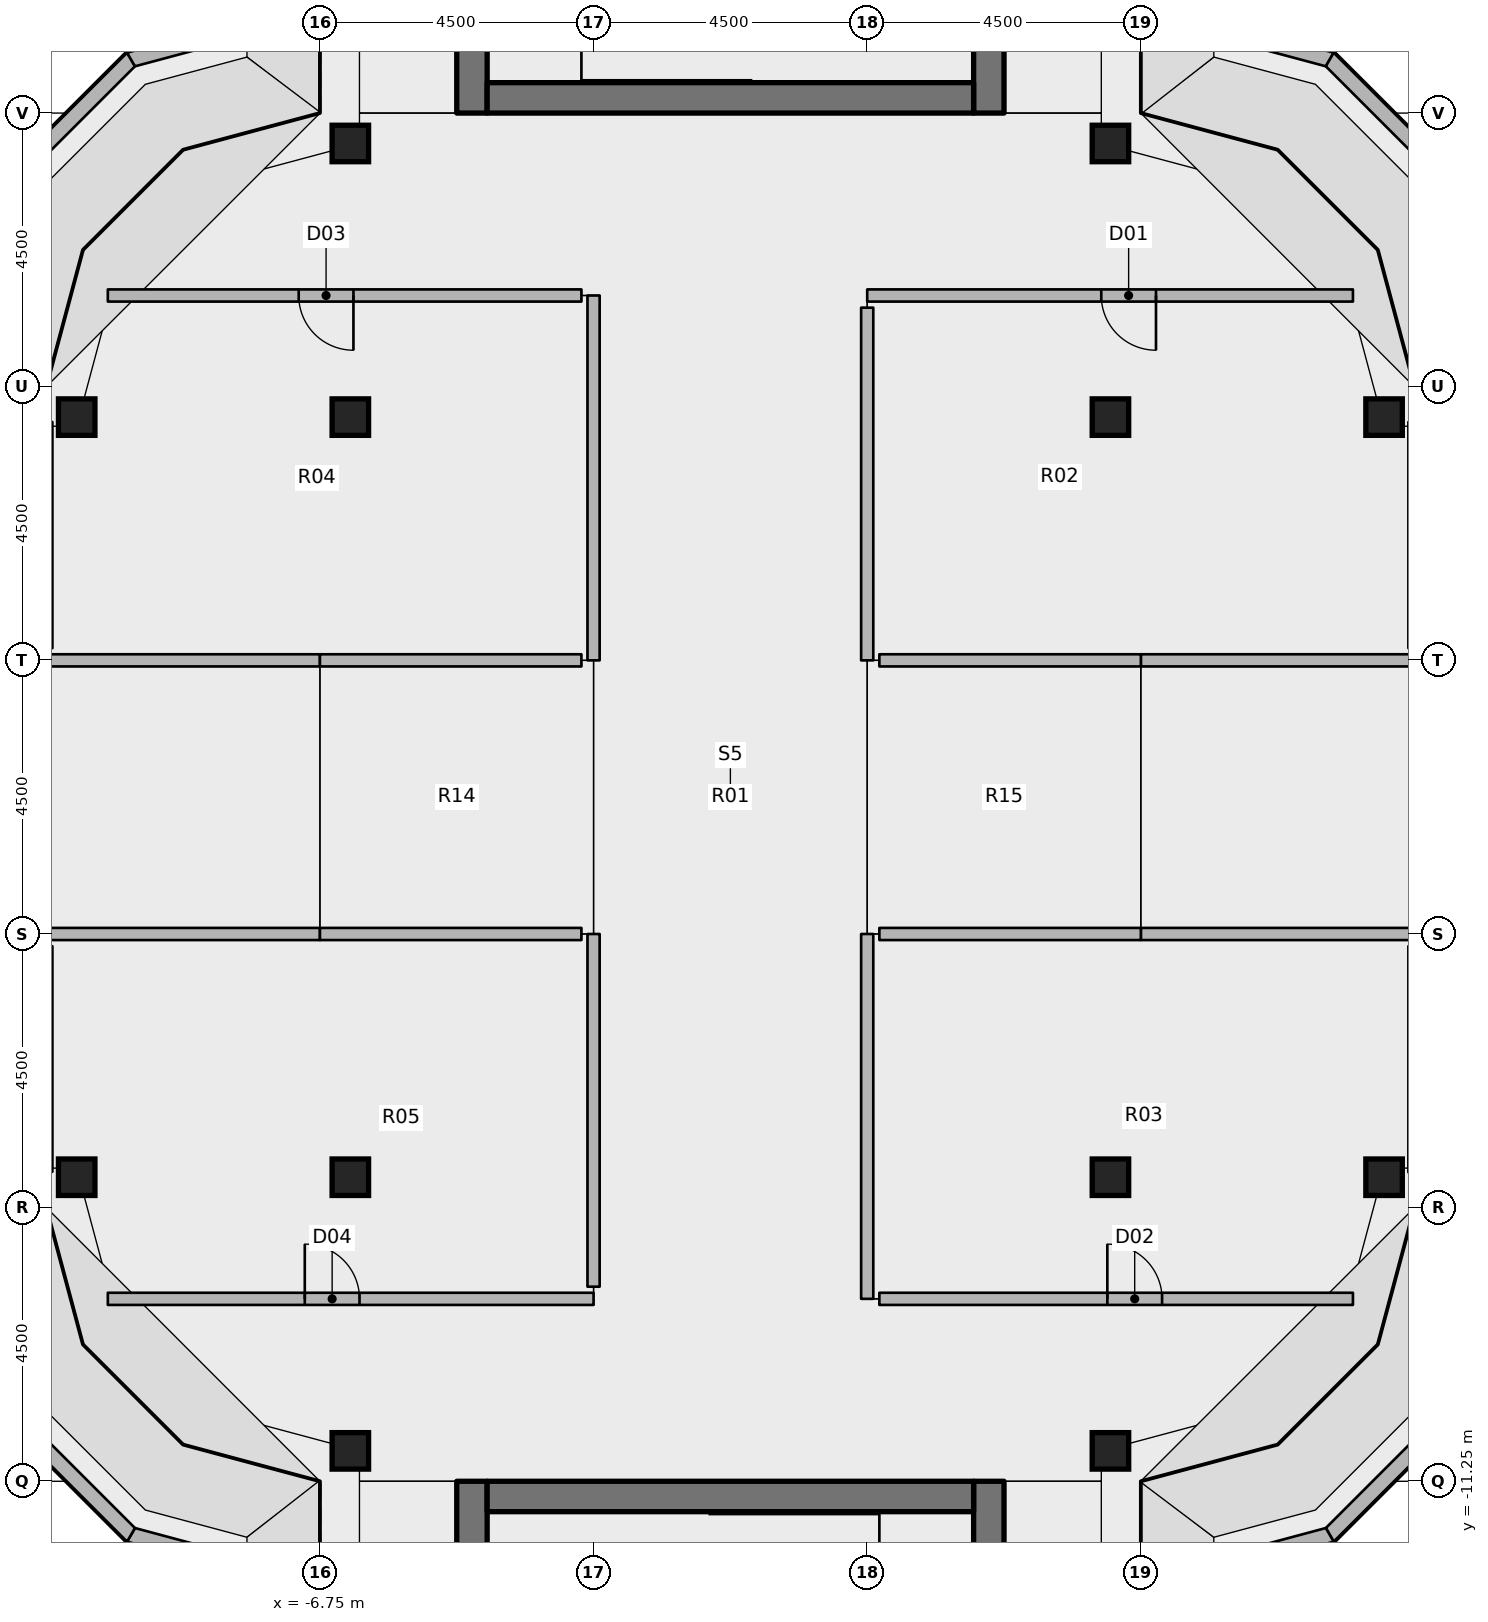
"""IFC4 building model, lengths in metres.
Left out: names, types, materials, properties, quantities, classifications, styles, units other than length and angle.
Written with IfcOpenShell. Run it as: python <this file> out.ifc"""

import sys

from ifc_helpers import new_model, si_unit, direction, frame, frame_2d, origin, origin_2d, place, context, subcontext, project, spatial, polyline, rectangle, outline, extrude, element, fill, save


model = new_model("IFC4")
c1 = context("Model", 3, precision=1e-05, world=origin(), true_north=direction((0.0, 1.0)))
c2 = subcontext(c1, "Body", "Model", "MODEL_VIEW")
j1 = project(units=[si_unit("LENGTHUNIT", "METRE"), si_unit("PLANEANGLEUNIT", "RADIAN")], contexts=[c1])
p1 = place(None, origin())
s1 = spatial("IfcSite", under=j1, at=p1, CompositionType="ELEMENT")
p2 = place(p1, origin())
s2 = spatial("IfcBuilding", under=s1, at=p2, CompositionType="ELEMENT")
p3 = place(p2, frame((0.0, 0.0, 295.2)))
s3 = spatial("IfcBuildingStorey", under=s2, at=p3, CompositionType="ELEMENT", Elevation=295.2)
for number, where, z_axis, x_axis in (
    (1, (-10.75, -6.25, 0.0), (0.0, 0.0, 1.0), (1.0, 0.0, 0.0)),
    (2, (-10.75, 6.25, 0.0), (0.0, 0.0, 1.0), (1.0, 0.0, 0.0)),
    (3, (-6.25, -10.75, 0.0), (0.0, 0.0, 1.0), (1.0, 0.0, 0.0)),
    (4, (-6.25, -6.25, 0.0), (0.0, 0.0, 1.0), (1.0, 0.0, 0.0)),
    (5, (-6.25, 6.25, 0.0), (0.0, 0.0, 1.0), (1.0, 0.0, 0.0)),
    (6, (-6.25, 10.75, 0.0), (0.0, 0.0, 1.0), (1.0, 0.0, 0.0)),
    (7, (6.25, -10.75, 0.0), (0.0, 0.0, 1.0), (1.0, 0.0, 0.0)),
    (8, (6.25, -6.25, 0.0), (0.0, 0.0, 1.0), (1.0, 0.0, 0.0)),
    (9, (6.25, 6.25, 0.0), (0.0, 0.0, 1.0), (1.0, 0.0, 0.0)),
    (10, (6.25, 10.75, 0.0), (0.0, 0.0, 1.0), (1.0, 0.0, 0.0)),
    (11, (10.75, -6.25, 0.0), (0.0, 0.0, 1.0), (1.0, 0.0, 0.0)),
    (12, (10.75, 6.25, 0.0), (0.0, 0.0, 1.0), (1.0, 0.0, 0.0)),
):
    element("IfcColumn", number, at=place(p3, frame(where, z_axis=z_axis, x_axis=x_axis)), inside=s3, PredefinedType="COLUMN", context=c2, shape_type="SweptSolid", body=[
        extrude(rectangle(XDim=0.6, YDim=0.6, at=origin_2d()), origin(), (0.0, 0.0, 1.0), 3.45),
    ])
p4 = place(p3, frame((-4.25, 11.25, 0.0), z_axis=(0.0, 0.0, 1.0), x_axis=(0.0, 1.0, 0.0)))
e13 = element("IfcWall", 13, at=p4, inside=s3, PredefinedType="SHEAR", context=c2, shape_type="SweptSolid", body=[
    extrude(rectangle(XDim=15.0, YDim=0.5, at=frame_2d((7.5, 0.0))), origin(), (0.0, 0.0, 1.0), 3.6),
])
p5 = place(p4, frame((7.15, 0.0, 0.0)))
e14 = element("IfcOpeningElement", 14, at=p5, cuts=e13, PredefinedType="OPENING", context=c2, shape_type="SweptSolid", body=[
    extrude(rectangle(XDim=1.5, YDim=2.3, at=frame_2d((0.75, 1.15))), frame((0.0, 0.26, 0.0), z_axis=(0.0, -1.0, 0.0), x_axis=(1.0, 0.0, 0.0)), (0.0, 0.0, 1.0), 0.52),
])
p6 = place(p4, frame((13.9, 0.0, 0.0)))
e15 = element("IfcOpeningElement", 15, at=p6, cuts=e13, PredefinedType="OPENING", context=c2, shape_type="SweptSolid", body=[
    extrude(rectangle(XDim=0.9, YDim=2.1, at=frame_2d((0.45, 1.05))), frame((0.0, 0.26, 0.0), z_axis=(0.0, -1.0, 0.0), x_axis=(1.0, 0.0, 0.0)), (0.0, 0.0, 1.0), 0.52),
])
p7 = place(p4, frame((1.15, 0.0, 0.0)))
e16 = element("IfcOpeningElement", 16, at=p7, cuts=e13, PredefinedType="OPENING", context=c2, shape_type="SweptSolid", body=[
    extrude(rectangle(XDim=1.2, YDim=2.1, at=frame_2d((0.6, 1.05))), frame((0.0, 0.26, 0.0), z_axis=(0.0, -1.0, 0.0), x_axis=(1.0, 0.0, 0.0)), (0.0, 0.0, 1.0), 0.52),
])
p8 = place(p3, frame((4.25, 11.25, 0.0), z_axis=(0.0, 0.0, 1.0), x_axis=(0.0, 1.0, 0.0)))
e17 = element("IfcWall", 17, at=p8, inside=s3, PredefinedType="SHEAR", context=c2, shape_type="SweptSolid", body=[
    extrude(rectangle(XDim=15.0, YDim=0.5, at=frame_2d((7.5, 0.0))), origin(), (0.0, 0.0, 1.0), 3.6),
])
p9 = place(p8, frame((7.15, 0.0, 0.0)))
e18 = element("IfcOpeningElement", 18, at=p9, cuts=e17, PredefinedType="OPENING", context=c2, shape_type="SweptSolid", body=[
    extrude(rectangle(XDim=1.5, YDim=2.3, at=frame_2d((0.75, 1.15))), frame((0.0, 0.26, 0.0), z_axis=(0.0, -1.0, 0.0), x_axis=(1.0, 0.0, 0.0)), (0.0, 0.0, 1.0), 0.52),
])
p10 = place(p8, frame((5.55, 0.0, 0.0)))
e19 = element("IfcOpeningElement", 19, at=p10, cuts=e17, PredefinedType="OPENING", context=c2, shape_type="SweptSolid", body=[
    extrude(rectangle(XDim=1.2, YDim=2.1, at=frame_2d((0.6, 1.05))), frame((0.0, 0.26, 0.0), z_axis=(0.0, -1.0, 0.0), x_axis=(1.0, 0.0, 0.0)), (0.0, 0.0, 1.0), 0.52),
])
p11 = place(p3, frame((-4.0, 11.5, 0.0), z_axis=(0.0, 0.0, 1.0), x_axis=(1.0, 0.0, 0.0)))
e20 = element("IfcWall", 20, at=p11, inside=s3, PredefinedType="SHEAR", context=c2, shape_type="SweptSolid", body=[
    extrude(rectangle(XDim=8.0, YDim=0.5, at=frame_2d((4.0, 0.0))), origin(), (0.0, 0.0, 1.0), 3.6),
])
p12 = place(p3, frame((-4.25, -11.25, 0.0), z_axis=(0.0, 0.0, 1.0), x_axis=(0.0, -1.0, 0.0)))
e21 = element("IfcWall", 21, at=p12, inside=s3, PredefinedType="SHEAR", context=c2, shape_type="SweptSolid", body=[
    extrude(rectangle(XDim=15.0, YDim=0.5, at=frame_2d((7.5, 0.0))), origin(), (0.0, 0.0, 1.0), 3.6),
])
p13 = place(p12, frame((7.15, 0.0, 0.0)))
e22 = element("IfcOpeningElement", 22, at=p13, cuts=e21, PredefinedType="OPENING", context=c2, shape_type="SweptSolid", body=[
    extrude(rectangle(XDim=1.5, YDim=2.3, at=frame_2d((0.75, 1.15))), frame((0.0, 0.26, 0.0), z_axis=(0.0, -1.0, 0.0), x_axis=(1.0, 0.0, 0.0)), (0.0, 0.0, 1.0), 0.52),
])
p14 = place(p12, frame((5.55, 0.0, 0.0)))
e23 = element("IfcOpeningElement", 23, at=p14, cuts=e21, PredefinedType="OPENING", context=c2, shape_type="SweptSolid", body=[
    extrude(rectangle(XDim=1.2, YDim=2.1, at=frame_2d((0.6, 1.05))), frame((0.0, 0.26, 0.0), z_axis=(0.0, -1.0, 0.0), x_axis=(1.0, 0.0, 0.0)), (0.0, 0.0, 1.0), 0.52),
])
p15 = place(p3, frame((4.25, -11.25, 0.0), z_axis=(0.0, 0.0, 1.0), x_axis=(0.0, -1.0, 0.0)))
e24 = element("IfcWall", 24, at=p15, inside=s3, PredefinedType="SHEAR", context=c2, shape_type="SweptSolid", body=[
    extrude(rectangle(XDim=15.0, YDim=0.5, at=frame_2d((7.5, 0.0))), origin(), (0.0, 0.0, 1.0), 3.6),
])
p16 = place(p15, frame((7.15, 0.0, 0.0)))
e25 = element("IfcOpeningElement", 25, at=p16, cuts=e24, PredefinedType="OPENING", context=c2, shape_type="SweptSolid", body=[
    extrude(rectangle(XDim=1.5, YDim=2.3, at=frame_2d((0.75, 1.15))), frame((0.0, 0.26, 0.0), z_axis=(0.0, -1.0, 0.0), x_axis=(1.0, 0.0, 0.0)), (0.0, 0.0, 1.0), 0.52),
])
p17 = place(p15, frame((13.9, 0.0, 0.0)))
e26 = element("IfcOpeningElement", 26, at=p17, cuts=e24, PredefinedType="OPENING", context=c2, shape_type="SweptSolid", body=[
    extrude(rectangle(XDim=0.9, YDim=2.1, at=frame_2d((0.45, 1.05))), frame((0.0, 0.26, 0.0), z_axis=(0.0, -1.0, 0.0), x_axis=(1.0, 0.0, 0.0)), (0.0, 0.0, 1.0), 0.52),
])
p18 = place(p15, frame((1.15, 0.0, 0.0)))
e27 = element("IfcOpeningElement", 27, at=p18, cuts=e24, PredefinedType="OPENING", context=c2, shape_type="SweptSolid", body=[
    extrude(rectangle(XDim=1.2, YDim=2.1, at=frame_2d((0.6, 1.05))), frame((0.0, 0.26, 0.0), z_axis=(0.0, -1.0, 0.0), x_axis=(1.0, 0.0, 0.0)), (0.0, 0.0, 1.0), 0.52),
])
p19 = place(p3, frame((-4.0, -11.5, 0.0), z_axis=(0.0, 0.0, 1.0), x_axis=(1.0, 0.0, 0.0)))
e28 = element("IfcWall", 28, at=p19, inside=s3, PredefinedType="SHEAR", context=c2, shape_type="SweptSolid", body=[
    extrude(rectangle(XDim=8.0, YDim=0.5, at=frame_2d((4.0, 0.0))), origin(), (0.0, 0.0, 1.0), 3.6),
])
p20 = place(p3, origin())
e29 = element("IfcWall", 29, at=p20, inside=s3, PredefinedType="PARAPET", context=c2, shape_type="SweptSolid", body=[
    extrude(outline(polyline([(-8.53, -12.616), (-9.921, -12.243), (-9.792, -12.019), (-8.28, -12.424), (-8.53, -12.616)])), origin(), (0.0, 0.0, 1.0), 1.22),
])
p21 = place(p3, origin())
e30 = element("IfcWall", 30, at=p21, inside=s3, PredefinedType="PARAPET", context=c2, shape_type="SweptSolid", body=[
    extrude(outline(polyline([(-9.921, -12.243), (-12.243, -9.921), (-12.019, -9.792), (-9.792, -12.019), (-9.921, -12.243)])), origin(), (0.0, 0.0, 1.0), 1.22),
])
p22 = place(p3, origin())
e31 = element("IfcWall", 31, at=p22, inside=s3, PredefinedType="PARAPET", context=c2, shape_type="SweptSolid", body=[
    extrude(outline(polyline([(-12.243, 9.921), (-9.921, 12.243), (-9.792, 12.019), (-12.019, 9.792), (-12.243, 9.921)])), origin(), (0.0, 0.0, 1.0), 1.22),
])
p23 = place(p3, origin())
e32 = element("IfcWall", 32, at=p23, inside=s3, PredefinedType="PARAPET", context=c2, shape_type="SweptSolid", body=[
    extrude(outline(polyline([(-9.921, 12.243), (-8.53, 12.616), (-8.28, 12.424), (-9.792, 12.019), (-9.921, 12.243)])), origin(), (0.0, 0.0, 1.0), 1.22),
])
p24 = place(p3, origin())
e33 = element("IfcWall", 33, at=p24, inside=s3, PredefinedType="PARAPET", context=c2, shape_type="SweptSolid", body=[
    extrude(outline(polyline([(8.53, 12.616), (9.921, 12.243), (9.792, 12.019), (8.28, 12.424), (8.53, 12.616)])), origin(), (0.0, 0.0, 1.0), 1.22),
])
p25 = place(p3, origin())
e34 = element("IfcWall", 34, at=p25, inside=s3, PredefinedType="PARAPET", context=c2, shape_type="SweptSolid", body=[
    extrude(outline(polyline([(9.921, 12.243), (12.243, 9.921), (12.019, 9.792), (9.792, 12.019), (9.921, 12.243)])), origin(), (0.0, 0.0, 1.0), 1.22),
])
p26 = place(p3, origin())
e35 = element("IfcWall", 35, at=p26, inside=s3, PredefinedType="PARAPET", context=c2, shape_type="SweptSolid", body=[
    extrude(outline(polyline([(12.243, -9.921), (9.921, -12.243), (9.792, -12.019), (12.019, -9.792), (12.243, -9.921)])), origin(), (0.0, 0.0, 1.0), 1.22),
])
p27 = place(p3, origin())
e36 = element("IfcWall", 36, at=p27, inside=s3, PredefinedType="PARAPET", context=c2, shape_type="SweptSolid", body=[
    extrude(outline(polyline([(9.921, -12.243), (8.53, -12.616), (8.28, -12.424), (9.792, -12.019), (9.921, -12.243)])), origin(), (0.0, 0.0, 1.0), 1.22),
])
p28 = place(p3, frame((10.238, 8.25, 0.0), z_axis=(0.0, 0.0, 1.0), x_axis=(-1.0, 0.0, 0.0)))
e37 = element("IfcWall", 37, at=p28, inside=s3, PredefinedType="PARTITIONING", context=c2, shape_type="SweptSolid", body=[
    extrude(rectangle(XDim=7.988, YDim=0.2, at=frame_2d((3.994, 0.0))), origin(), (0.0, 0.0, 1.0), 3.45),
])
p29 = place(p28, frame((3.239, 0.0, 0.0)))
e38 = element("IfcOpeningElement", 38, at=p29, cuts=e37, PredefinedType="OPENING", context=c2, shape_type="SweptSolid", body=[
    extrude(rectangle(XDim=0.9, YDim=2.1, at=frame_2d((0.45, 1.05))), frame((0.0, 0.11, 0.0), z_axis=(0.0, -1.0, 0.0), x_axis=(1.0, 0.0, 0.0)), (0.0, 0.0, 1.0), 0.22),
])
p30 = place(p3, frame((2.25, 8.05, 0.0), z_axis=(0.0, 0.0, 1.0), x_axis=(0.0, -1.0, 0.0)))
e39 = element("IfcWall", 39, at=p30, inside=s3, PredefinedType="PARTITIONING", context=c2, shape_type="SweptSolid", body=[
    extrude(rectangle(XDim=5.8, YDim=0.2, at=frame_2d((2.9, 0.0))), origin(), (0.0, 0.0, 1.0), 2.681),
])
p31 = place(p3, frame((2.25, -2.25, 0.0), z_axis=(0.0, 0.0, 1.0), x_axis=(0.0, -1.0, 0.0)))
e40 = element("IfcWall", 40, at=p31, inside=s3, PredefinedType="PARTITIONING", context=c2, shape_type="SweptSolid", body=[
    extrude(rectangle(XDim=6.0, YDim=0.2, at=frame_2d((3.0, 0.0))), origin(), (0.0, 0.0, 1.0), 2.681),
])
p32 = place(p3, frame((2.45, -8.25, 0.0), z_axis=(0.0, 0.0, 1.0), x_axis=(1.0, 0.0, 0.0)))
e41 = element("IfcWall", 41, at=p32, inside=s3, PredefinedType="PARTITIONING", context=c2, shape_type="SweptSolid", body=[
    extrude(rectangle(XDim=7.788, YDim=0.2, at=frame_2d((3.894, 0.0))), origin(), (0.0, 0.0, 1.0), 3.45),
])
p33 = place(p32, frame((3.749, 0.0, 0.0)))
e42 = element("IfcOpeningElement", 42, at=p33, cuts=e41, PredefinedType="OPENING", context=c2, shape_type="SweptSolid", body=[
    extrude(rectangle(XDim=0.9, YDim=2.1, at=frame_2d((0.45, 1.05))), frame((0.0, 0.11, 0.0), z_axis=(0.0, -1.0, 0.0), x_axis=(1.0, 0.0, 0.0)), (0.0, 0.0, 1.0), 0.22),
])
p34 = place(p3, frame((-2.25, 2.25, 0.0), z_axis=(0.0, 0.0, 1.0), x_axis=(0.0, 1.0, 0.0)))
e43 = element("IfcWall", 43, at=p34, inside=s3, PredefinedType="PARTITIONING", context=c2, shape_type="SweptSolid", body=[
    extrude(rectangle(XDim=6.0, YDim=0.2, at=frame_2d((3.0, 0.0))), origin(), (0.0, 0.0, 1.0), 2.681),
])
p35 = place(p3, frame((-2.45, 8.25, 0.0), z_axis=(0.0, 0.0, 1.0), x_axis=(-1.0, 0.0, 0.0)))
e44 = element("IfcWall", 44, at=p35, inside=s3, PredefinedType="PARTITIONING", context=c2, shape_type="SweptSolid", body=[
    extrude(rectangle(XDim=7.788, YDim=0.2, at=frame_2d((3.894, 0.0))), origin(), (0.0, 0.0, 1.0), 3.45),
])
p36 = place(p35, frame((3.749, 0.0, 0.0)))
e45 = element("IfcOpeningElement", 45, at=p36, cuts=e44, PredefinedType="OPENING", context=c2, shape_type="SweptSolid", body=[
    extrude(rectangle(XDim=0.9, YDim=2.1, at=frame_2d((0.45, 1.05))), frame((0.0, 0.11, 0.0), z_axis=(0.0, -1.0, 0.0), x_axis=(1.0, 0.0, 0.0)), (0.0, 0.0, 1.0), 0.22),
])
p37 = place(p3, frame((-10.238, -8.25, 0.0), z_axis=(0.0, 0.0, 1.0), x_axis=(1.0, 0.0, 0.0)))
e46 = element("IfcWall", 46, at=p37, inside=s3, PredefinedType="PARTITIONING", context=c2, shape_type="SweptSolid", body=[
    extrude(rectangle(XDim=7.988, YDim=0.2, at=frame_2d((3.994, 0.0))), origin(), (0.0, 0.0, 1.0), 3.45),
])
p38 = place(p37, frame((3.239, 0.0, 0.0)))
e47 = element("IfcOpeningElement", 47, at=p38, cuts=e46, PredefinedType="OPENING", context=c2, shape_type="SweptSolid", body=[
    extrude(rectangle(XDim=0.9, YDim=2.1, at=frame_2d((0.45, 1.05))), frame((0.0, 0.11, 0.0), z_axis=(0.0, -1.0, 0.0), x_axis=(1.0, 0.0, 0.0)), (0.0, 0.0, 1.0), 0.22),
])
p39 = place(p3, frame((-2.25, -8.05, 0.0), z_axis=(0.0, 0.0, 1.0), x_axis=(0.0, 1.0, 0.0)))
e48 = element("IfcWall", 48, at=p39, inside=s3, PredefinedType="PARTITIONING", context=c2, shape_type="SweptSolid", body=[
    extrude(rectangle(XDim=5.8, YDim=0.2, at=frame_2d((2.9, 0.0))), origin(), (0.0, 0.0, 1.0), 2.681),
])
p40 = place(p3, frame((11.25, 2.25, 0.0), z_axis=(0.0, 0.0, 1.0), x_axis=(-1.0, 0.0, 0.0)))
e49 = element("IfcWall", 49, at=p40, inside=s3, PredefinedType="PARTITIONING", context=c2, shape_type="SweptSolid", body=[
    extrude(rectangle(XDim=4.5, YDim=0.2, at=frame_2d((2.25, 0.0))), origin(), (0.0, 0.0, 1.0), 2.53),
])
p41 = place(p3, frame((6.75, 2.25, 0.0), z_axis=(0.0, 0.0, 1.0), x_axis=(-1.0, 0.0, 0.0)))
e50 = element("IfcWall", 50, at=p41, inside=s3, PredefinedType="PARTITIONING", context=c2, shape_type="SweptSolid", body=[
    extrude(rectangle(XDim=4.3, YDim=0.2, at=frame_2d((2.15, 0.0))), origin(), (0.0, 0.0, 1.0), 2.828),
])
p42 = place(p3, frame((6.75, -2.25, 0.0), z_axis=(0.0, 0.0, 1.0), x_axis=(1.0, 0.0, 0.0)))
e51 = element("IfcWall", 51, at=p42, inside=s3, PredefinedType="PARTITIONING", context=c2, shape_type="SweptSolid", body=[
    extrude(rectangle(XDim=4.5, YDim=0.2, at=frame_2d((2.25, 0.0))), origin(), (0.0, 0.0, 1.0), 2.53),
])
p43 = place(p3, frame((2.45, -2.25, 0.0), z_axis=(0.0, 0.0, 1.0), x_axis=(1.0, 0.0, 0.0)))
e52 = element("IfcWall", 52, at=p43, inside=s3, PredefinedType="PARTITIONING", context=c2, shape_type="SweptSolid", body=[
    extrude(rectangle(XDim=4.3, YDim=0.2, at=frame_2d((2.15, 0.0))), origin(), (0.0, 0.0, 1.0), 2.828),
])
p44 = place(p3, frame((-6.75, 2.25, 0.0), z_axis=(0.0, 0.0, 1.0), x_axis=(-1.0, 0.0, 0.0)))
e53 = element("IfcWall", 53, at=p44, inside=s3, PredefinedType="PARTITIONING", context=c2, shape_type="SweptSolid", body=[
    extrude(rectangle(XDim=4.5, YDim=0.2, at=frame_2d((2.25, 0.0))), origin(), (0.0, 0.0, 1.0), 2.53),
])
p45 = place(p3, frame((-2.45, 2.25, 0.0), z_axis=(0.0, 0.0, 1.0), x_axis=(-1.0, 0.0, 0.0)))
e54 = element("IfcWall", 54, at=p45, inside=s3, PredefinedType="PARTITIONING", context=c2, shape_type="SweptSolid", body=[
    extrude(rectangle(XDim=4.3, YDim=0.2, at=frame_2d((2.15, 0.0))), origin(), (0.0, 0.0, 1.0), 2.828),
])
p46 = place(p3, frame((-11.25, -2.25, 0.0), z_axis=(0.0, 0.0, 1.0), x_axis=(1.0, 0.0, 0.0)))
e55 = element("IfcWall", 55, at=p46, inside=s3, PredefinedType="PARTITIONING", context=c2, shape_type="SweptSolid", body=[
    extrude(rectangle(XDim=4.5, YDim=0.2, at=frame_2d((2.25, 0.0))), origin(), (0.0, 0.0, 1.0), 2.53),
])
p47 = place(p3, frame((-6.75, -2.25, 0.0), z_axis=(0.0, 0.0, 1.0), x_axis=(1.0, 0.0, 0.0)))
e56 = element("IfcWall", 56, at=p47, inside=s3, PredefinedType="PARTITIONING", context=c2, shape_type="SweptSolid", body=[
    extrude(rectangle(XDim=4.3, YDim=0.2, at=frame_2d((2.15, 0.0))), origin(), (0.0, 0.0, 1.0), 2.828),
])
p48 = place(p29, origin())
e57 = element("IfcDoor", 57, at=p48, inside=s3, OperationType="SINGLE_SWING_LEFT", PredefinedType="DOOR", context=c2, shape_type="SweptSolid", body=[
    extrude(rectangle(XDim=0.9, YDim=2.1, at=frame_2d((0.45, 1.05))), frame((0.0, 0.025, 0.0), z_axis=(0.0, -1.0, 0.0), x_axis=(1.0, 0.0, 0.0)), (0.0, 0.0, 1.0), 0.05),
])
fill(e38, e57)
p49 = place(p33, origin())
e58 = element("IfcDoor", 58, at=p49, inside=s3, OperationType="SINGLE_SWING_LEFT", PredefinedType="DOOR", context=c2, shape_type="SweptSolid", body=[
    extrude(rectangle(XDim=0.9, YDim=2.1, at=frame_2d((0.45, 1.05))), frame((0.0, 0.025, 0.0), z_axis=(0.0, -1.0, 0.0), x_axis=(1.0, 0.0, 0.0)), (0.0, 0.0, 1.0), 0.05),
])
fill(e42, e58)
p50 = place(p36, origin())
e59 = element("IfcDoor", 59, at=p50, inside=s3, OperationType="SINGLE_SWING_LEFT", PredefinedType="DOOR", context=c2, shape_type="SweptSolid", body=[
    extrude(rectangle(XDim=0.9, YDim=2.1, at=frame_2d((0.45, 1.05))), frame((0.0, 0.025, 0.0), z_axis=(0.0, -1.0, 0.0), x_axis=(1.0, 0.0, 0.0)), (0.0, 0.0, 1.0), 0.05),
])
fill(e45, e59)
p51 = place(p38, origin())
e60 = element("IfcDoor", 60, at=p51, inside=s3, OperationType="SINGLE_SWING_LEFT", PredefinedType="DOOR", context=c2, shape_type="SweptSolid", body=[
    extrude(rectangle(XDim=0.9, YDim=2.1, at=frame_2d((0.45, 1.05))), frame((0.0, 0.025, 0.0), z_axis=(0.0, -1.0, 0.0), x_axis=(1.0, 0.0, 0.0)), (0.0, 0.0, 1.0), 0.05),
])
fill(e47, e60)
save(model, sys.argv[1])
